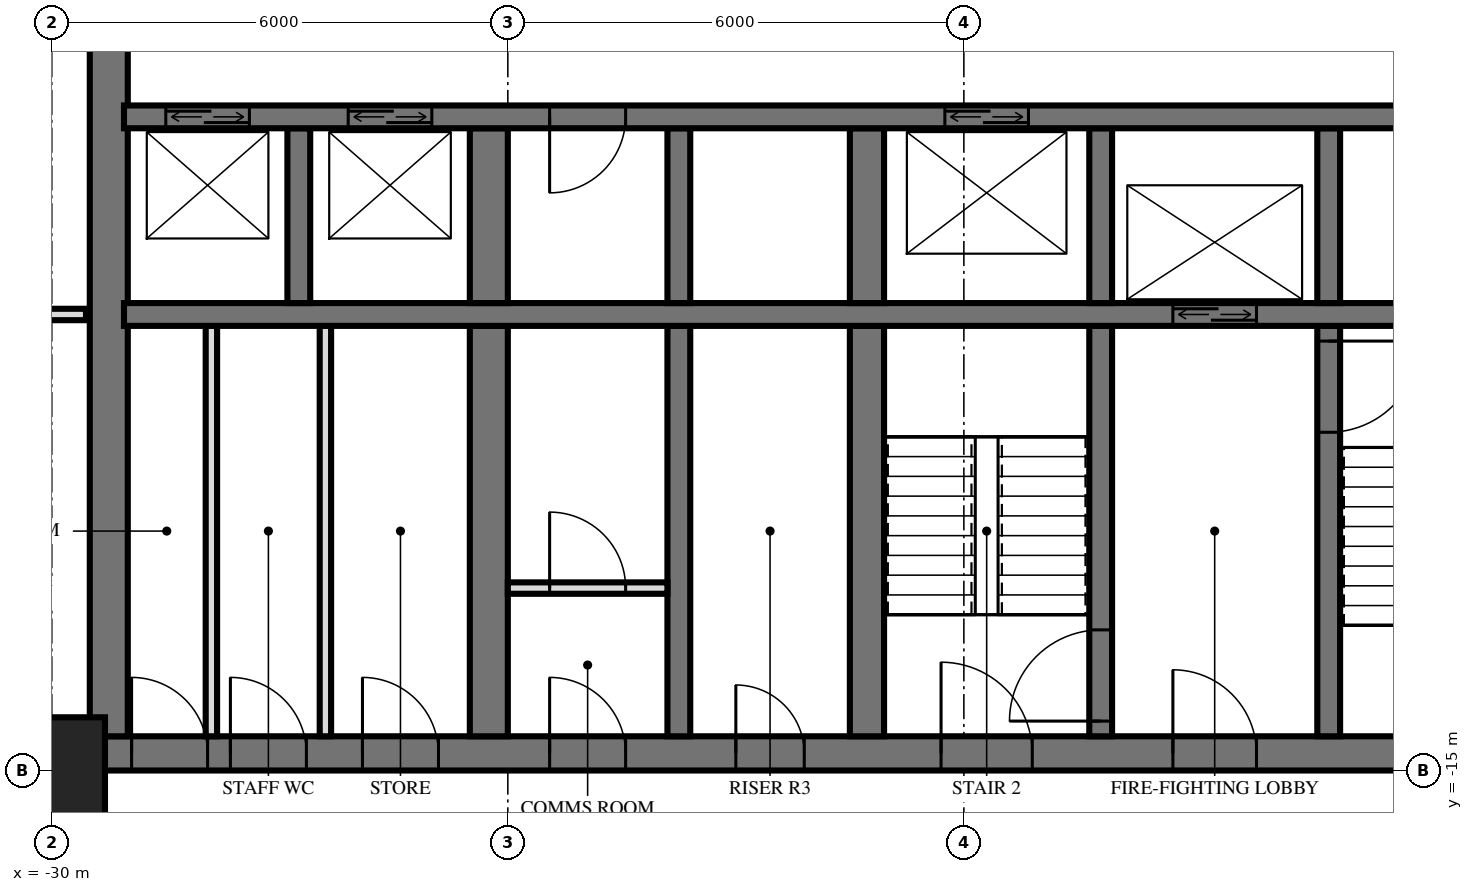
"""IFC4 building model, lengths in metres.
Left out: names, types, materials, properties, quantities, classifications, styles, units other than length and angle.
Written with IfcOpenShell. Run it as: python <this file> out.ifc"""

import sys

from ifc_helpers import new_model, si_unit, direction, frame, frame_2d, origin, origin_2d, place, context, subcontext, project, spatial, rectangle, extrude, element, fill, save


model = new_model("IFC4")
c1 = context("Model", 3, precision=1e-05, world=origin(), true_north=direction((0.0, 1.0)))
c2 = subcontext(c1, "Body", "Model", "MODEL_VIEW")
j1 = project(units=[si_unit("LENGTHUNIT", "METRE"), si_unit("PLANEANGLEUNIT", "RADIAN")], contexts=[c1])
p1 = place(None, origin())
s1 = spatial("IfcSite", under=j1, at=p1, CompositionType="ELEMENT")
p2 = place(p1, origin())
s2 = spatial("IfcBuilding", under=s1, at=p2, CompositionType="ELEMENT")
p3 = place(p2, frame((0.0, 0.0, 42.0)))
s3 = spatial("IfcBuildingStorey", under=s2, at=p3, CompositionType="ELEMENT", Elevation=42.0)
p4 = place(p3, frame((-30.0, -15.0, 0.0), z_axis=(0.0, 0.0, 1.0), x_axis=(1.0, 0.0, 0.0)))
e1 = element("IfcColumn", 1, at=p4, inside=s3, PredefinedType="COLUMN", context=c2, shape_type="SweptSolid", body=[
    extrude(rectangle(XDim=1.4, YDim=1.4, at=origin_2d()), origin(), (0.0, 0.0, 1.0), 3.6),
])
p5 = place(p3, frame((-29.5, -14.775, 0.0), z_axis=(0.0, 0.0, 1.0), x_axis=(1.0, 0.0, 0.0)))
e2 = element("IfcWall", 2, at=p5, inside=s3, PredefinedType="SHEAR", context=c2, shape_type="SweptSolid", body=[
    extrude(rectangle(XDim=19.5, YDim=0.45, at=frame_2d((9.75, 0.0))), origin(), (0.0, 0.0, 1.0), 3.6),
])
p6 = place(p5, frame((11.2, 0.0, 0.0)))
e3 = element("IfcOpeningElement", 3, at=p6, cuts=e2, PredefinedType="OPENING", context=c2, shape_type="SweptSolid", body=[
    extrude(rectangle(XDim=1.2, YDim=2.1, at=frame_2d((0.6, 1.05))), frame((0.0, 0.235, 0.0), z_axis=(0.0, -1.0, 0.0), x_axis=(1.0, 0.0, 0.0)), (0.0, 0.0, 1.0), 0.47),
])
p7 = place(p5, frame((14.25, 0.0, 0.0)))
e4 = element("IfcOpeningElement", 4, at=p7, cuts=e2, PredefinedType="OPENING", context=c2, shape_type="SweptSolid", body=[
    extrude(rectangle(XDim=1.1, YDim=2.1, at=frame_2d((0.55, 1.05))), frame((0.0, 0.235, 0.0), z_axis=(0.0, -1.0, 0.0), x_axis=(1.0, 0.0, 0.0)), (0.0, 0.0, 1.0), 0.47),
])
p8 = place(p5, frame((8.5, 0.0, 0.0)))
e5 = element("IfcOpeningElement", 5, at=p8, cuts=e2, PredefinedType="OPENING", context=c2, shape_type="SweptSolid", body=[
    extrude(rectangle(XDim=0.9, YDim=2.1, at=frame_2d((0.45, 1.05))), frame((0.0, 0.235, 0.0), z_axis=(0.0, -1.0, 0.0), x_axis=(1.0, 0.0, 0.0)), (0.0, 0.0, 1.0), 0.47),
])
p9 = place(p5, frame((6.05, 0.0, 0.0)))
e6 = element("IfcOpeningElement", 6, at=p9, cuts=e2, PredefinedType="OPENING", context=c2, shape_type="SweptSolid", body=[
    extrude(rectangle(XDim=1.0, YDim=2.1, at=frame_2d((0.5, 1.05))), frame((0.0, 0.235, 0.0), z_axis=(0.0, -1.0, 0.0), x_axis=(1.0, 0.0, 0.0)), (0.0, 0.0, 1.0), 0.47),
])
p10 = place(p5, frame((3.587, 0.0, 0.0)))
e7 = element("IfcOpeningElement", 7, at=p10, cuts=e2, PredefinedType="OPENING", context=c2, shape_type="SweptSolid", body=[
    extrude(rectangle(XDim=1.0, YDim=2.1, at=frame_2d((0.5, 1.05))), frame((0.0, 0.235, 0.0), z_axis=(0.0, -1.0, 0.0), x_axis=(1.0, 0.0, 0.0)), (0.0, 0.0, 1.0), 0.47),
])
p11 = place(p5, frame((1.85, 0.0, 0.0)))
e8 = element("IfcOpeningElement", 8, at=p11, cuts=e2, PredefinedType="OPENING", context=c2, shape_type="SweptSolid", body=[
    extrude(rectangle(XDim=1.0, YDim=2.1, at=frame_2d((0.5, 1.05))), frame((0.0, 0.235, 0.0), z_axis=(0.0, -1.0, 0.0), x_axis=(1.0, 0.0, 0.0)), (0.0, 0.0, 1.0), 0.47),
])
p12 = place(p5, frame((0.55, 0.0, 0.0)))
e9 = element("IfcOpeningElement", 9, at=p12, cuts=e2, PredefinedType="OPENING", context=c2, shape_type="SweptSolid", body=[
    extrude(rectangle(XDim=1.0, YDim=2.1, at=frame_2d((0.5, 1.05))), frame((0.0, 0.235, 0.0), z_axis=(0.0, -1.0, 0.0), x_axis=(1.0, 0.0, 0.0)), (0.0, 0.0, 1.0), 0.47),
])
p13 = place(p3, frame((-29.25, -14.55, 0.0), z_axis=(0.0, 0.0, 1.0), x_axis=(0.0, 1.0, 0.0)))
e10 = element("IfcWall", 10, at=p13, inside=s3, PredefinedType="SHEAR", context=c2, shape_type="SweptSolid", body=[
    extrude(rectangle(XDim=14.1, YDim=0.5, at=frame_2d((7.05, 0.0))), origin(), (0.0, 0.0, 1.0), 3.6),
])
p14 = place(p3, frame((-29.05, -6.4, 0.0), z_axis=(0.0, 0.0, 1.0), x_axis=(1.0, 0.0, 0.0)))
e11 = element("IfcWall", 11, at=p14, inside=s3, PredefinedType="SHEAR", context=c2, shape_type="SweptSolid", body=[
    extrude(rectangle(XDim=18.7, YDim=0.3, at=frame_2d((9.35, 0.0))), origin(), (0.0, 0.0, 1.0), 3.6),
])
p15 = place(p14, frame((2.95, 0.0, 0.0)))
e12 = element("IfcOpeningElement", 12, at=p15, cuts=e11, PredefinedType="OPENING", context=c2, shape_type="SweptSolid", body=[
    extrude(rectangle(XDim=1.1, YDim=2.1, at=frame_2d((0.55, 1.05))), frame((0.0, 0.16, 0.0), z_axis=(0.0, -1.0, 0.0), x_axis=(1.0, 0.0, 0.0)), (0.0, 0.0, 1.0), 0.32),
])
p16 = place(p14, frame((0.55, 0.0, 0.0)))
e13 = element("IfcOpeningElement", 13, at=p16, cuts=e11, PredefinedType="OPENING", context=c2, shape_type="SweptSolid", body=[
    extrude(rectangle(XDim=1.1, YDim=2.1, at=frame_2d((0.55, 1.05))), frame((0.0, 0.16, 0.0), z_axis=(0.0, -1.0, 0.0), x_axis=(1.0, 0.0, 0.0)), (0.0, 0.0, 1.0), 0.32),
])
p17 = place(p14, frame((10.8, 0.0, 0.0)))
e14 = element("IfcOpeningElement", 14, at=p17, cuts=e11, PredefinedType="OPENING", context=c2, shape_type="SweptSolid", body=[
    extrude(rectangle(XDim=1.1, YDim=2.1, at=frame_2d((0.55, 1.05))), frame((0.0, 0.16, 0.0), z_axis=(0.0, -1.0, 0.0), x_axis=(1.0, 0.0, 0.0)), (0.0, 0.0, 1.0), 0.32),
])
p18 = place(p14, frame((5.6, 0.0, 0.0)))
e15 = element("IfcOpeningElement", 15, at=p18, cuts=e11, PredefinedType="OPENING", context=c2, shape_type="SweptSolid", body=[
    extrude(rectangle(XDim=1.0, YDim=2.1, at=frame_2d((0.5, 1.05))), frame((0.0, 0.16, 0.0), z_axis=(0.0, -1.0, 0.0), x_axis=(1.0, 0.0, 0.0)), (0.0, 0.0, 1.0), 0.32),
])
p19 = place(p3, frame((-29.05, -9.0, 0.0), z_axis=(0.0, 0.0, 1.0), x_axis=(1.0, 0.0, 0.0)))
e16 = element("IfcWall", 16, at=p19, inside=s3, PredefinedType="SHEAR", context=c2, shape_type="SweptSolid", body=[
    extrude(rectangle(XDim=18.7, YDim=0.3, at=frame_2d((9.35, 0.0))), origin(), (0.0, 0.0, 1.0), 3.6),
])
p20 = place(p19, frame((13.8, 0.0, 0.0)))
e17 = element("IfcOpeningElement", 17, at=p20, cuts=e16, PredefinedType="OPENING", context=c2, shape_type="SweptSolid", body=[
    extrude(rectangle(XDim=1.1, YDim=2.1, at=frame_2d((0.55, 1.05))), frame((0.0, 0.16, 0.0), z_axis=(0.0, -1.0, 0.0), x_axis=(1.0, 0.0, 0.0)), (0.0, 0.0, 1.0), 0.32),
])
p21 = place(p3, frame((-13.2, -8.85, 0.0), z_axis=(0.0, 0.0, 1.0), x_axis=(0.0, 1.0, 0.0)))
e18 = element("IfcWall", 18, at=p21, inside=s3, PredefinedType="SHEAR", context=c2, shape_type="SweptSolid", body=[
    extrude(rectangle(XDim=2.3, YDim=0.3, at=frame_2d((1.15, 0.0))), origin(), (0.0, 0.0, 1.0), 3.6),
])
p22 = place(p3, frame((-13.2, -14.55, 0.0), z_axis=(0.0, 0.0, 1.0), x_axis=(0.0, 1.0, 0.0)))
e19 = element("IfcWall", 19, at=p22, inside=s3, PredefinedType="SHEAR", context=c2, shape_type="SweptSolid", body=[
    extrude(rectangle(XDim=5.4, YDim=0.3, at=frame_2d((2.7, 0.0))), origin(), (0.0, 0.0, 1.0), 3.6),
])
p23 = place(p22, frame((4.0, 0.0, 0.0)))
e20 = element("IfcOpeningElement", 20, at=p23, cuts=e19, PredefinedType="OPENING", context=c2, shape_type="SweptSolid", body=[
    extrude(rectangle(XDim=1.2, YDim=2.1, at=frame_2d((0.6, 1.05))), frame((0.0, 0.16, 0.0), z_axis=(0.0, -1.0, 0.0), x_axis=(1.0, 0.0, 0.0)), (0.0, 0.0, 1.0), 0.32),
])
p24 = place(p3, frame((-16.2, -8.85, 0.0), z_axis=(0.0, 0.0, 1.0), x_axis=(0.0, 1.0, 0.0)))
e21 = element("IfcWall", 21, at=p24, inside=s3, PredefinedType="SHEAR", context=c2, shape_type="SweptSolid", body=[
    extrude(rectangle(XDim=2.3, YDim=0.3, at=frame_2d((1.15, 0.0))), origin(), (0.0, 0.0, 1.0), 3.6),
])
p25 = place(p3, frame((-16.2, -14.55, 0.0), z_axis=(0.0, 0.0, 1.0), x_axis=(0.0, 1.0, 0.0)))
e22 = element("IfcWall", 22, at=p25, inside=s3, PredefinedType="SHEAR", context=c2, shape_type="SweptSolid", body=[
    extrude(rectangle(XDim=5.4, YDim=0.3, at=frame_2d((2.7, 0.0))), origin(), (0.0, 0.0, 1.0), 3.6),
])
p26 = place(p25, frame((0.2, 0.0, 0.0)))
e23 = element("IfcOpeningElement", 23, at=p26, cuts=e22, PredefinedType="OPENING", context=c2, shape_type="SweptSolid", body=[
    extrude(rectangle(XDim=1.2, YDim=2.1, at=frame_2d((0.6, 1.05))), frame((0.0, 0.16, 0.0), z_axis=(0.0, -1.0, 0.0), x_axis=(1.0, 0.0, 0.0)), (0.0, 0.0, 1.0), 0.32),
])
p27 = place(p3, frame((-19.275, -8.85, 0.0), z_axis=(0.0, 0.0, 1.0), x_axis=(0.0, 1.0, 0.0)))
e24 = element("IfcWall", 24, at=p27, inside=s3, PredefinedType="SHEAR", context=c2, shape_type="SweptSolid", body=[
    extrude(rectangle(XDim=2.3, YDim=0.45, at=frame_2d((1.15, 0.0))), origin(), (0.0, 0.0, 1.0), 3.6),
])
p28 = place(p3, frame((-19.275, -14.55, 0.0), z_axis=(0.0, 0.0, 1.0), x_axis=(0.0, 1.0, 0.0)))
e25 = element("IfcWall", 25, at=p28, inside=s3, PredefinedType="SHEAR", context=c2, shape_type="SweptSolid", body=[
    extrude(rectangle(XDim=5.4, YDim=0.45, at=frame_2d((2.7, 0.0))), origin(), (0.0, 0.0, 1.0), 3.6),
])
p29 = place(p3, frame((-21.75, -8.85, 0.0), z_axis=(0.0, 0.0, 1.0), x_axis=(0.0, 1.0, 0.0)))
e26 = element("IfcWall", 26, at=p29, inside=s3, PredefinedType="SHEAR", context=c2, shape_type="SweptSolid", body=[
    extrude(rectangle(XDim=2.3, YDim=0.3, at=frame_2d((1.15, 0.0))), origin(), (0.0, 0.0, 1.0), 3.6),
])
p30 = place(p3, frame((-21.75, -14.55, 0.0), z_axis=(0.0, 0.0, 1.0), x_axis=(0.0, 1.0, 0.0)))
e27 = element("IfcWall", 27, at=p30, inside=s3, PredefinedType="SHEAR", context=c2, shape_type="SweptSolid", body=[
    extrude(rectangle(XDim=5.4, YDim=0.3, at=frame_2d((2.7, 0.0))), origin(), (0.0, 0.0, 1.0), 3.6),
])
p31 = place(p3, frame((-24.25, -8.85, 0.0), z_axis=(0.0, 0.0, 1.0), x_axis=(0.0, 1.0, 0.0)))
e28 = element("IfcWall", 28, at=p31, inside=s3, PredefinedType="SHEAR", context=c2, shape_type="SweptSolid", body=[
    extrude(rectangle(XDim=2.3, YDim=0.5, at=frame_2d((1.15, 0.0))), origin(), (0.0, 0.0, 1.0), 3.6),
])
p32 = place(p3, frame((-24.25, -14.55, 0.0), z_axis=(0.0, 0.0, 1.0), x_axis=(0.0, 1.0, 0.0)))
e29 = element("IfcWall", 29, at=p32, inside=s3, PredefinedType="SHEAR", context=c2, shape_type="SweptSolid", body=[
    extrude(rectangle(XDim=5.4, YDim=0.5, at=frame_2d((2.7, 0.0))), origin(), (0.0, 0.0, 1.0), 3.6),
])
p33 = place(p3, frame((-26.75, -8.85, 0.0), z_axis=(0.0, 0.0, 1.0), x_axis=(0.0, 1.0, 0.0)))
e30 = element("IfcWall", 30, at=p33, inside=s3, PredefinedType="SHEAR", context=c2, shape_type="SweptSolid", body=[
    extrude(rectangle(XDim=2.3, YDim=0.3, at=frame_2d((1.15, 0.0))), origin(), (0.0, 0.0, 1.0), 3.6),
])
p34 = place(p3, frame((-24.0, -12.6, 0.0), z_axis=(0.0, 0.0, 1.0), x_axis=(1.0, 0.0, 0.0)))
e31 = element("IfcWall", 31, at=p34, inside=s3, PredefinedType="PARTITIONING", context=c2, shape_type="SweptSolid", body=[
    extrude(rectangle(XDim=2.1, YDim=0.15, at=frame_2d((1.05, 0.0))), origin(), (0.0, 0.0, 1.0), 3.3),
])
p35 = place(p34, frame((0.55, 0.0, 0.0)))
e32 = element("IfcOpeningElement", 32, at=p35, cuts=e31, PredefinedType="OPENING", context=c2, shape_type="SweptSolid", body=[
    extrude(rectangle(XDim=1.0, YDim=2.1, at=frame_2d((0.5, 1.05))), frame((0.0, 0.085, 0.0), z_axis=(0.0, -1.0, 0.0), x_axis=(1.0, 0.0, 0.0)), (0.0, 0.0, 1.0), 0.17),
])
for number, where, z_axis, x_axis in (
    (33, (-26.4, -14.55, 0.0), (0.0, 0.0, 1.0), (0.0, 1.0, 0.0)),
    (34, (-27.9, -14.55, 0.0), (0.0, 0.0, 1.0), (0.0, 1.0, 0.0)),
):
    element("IfcWall", number, at=place(p3, frame(where, z_axis=z_axis, x_axis=x_axis)), inside=s3, PredefinedType="PARTITIONING", context=c2, shape_type="SweptSolid", body=[
        extrude(rectangle(XDim=5.4, YDim=0.15, at=frame_2d((2.7, 0.0))), origin(), (0.0, 0.0, 1.0), 3.3),
    ])
p36 = place(p3, frame((-33.12, -15.0, 0.0), z_axis=(0.0, 0.0, 1.0), x_axis=(1.0, 0.0, 0.0)))
e35 = element("IfcWall", 35, at=p36, inside=s3, PredefinedType="PARTITIONING", context=c2, shape_type="SweptSolid", body=[
    extrude(rectangle(XDim=3.57, YDim=0.15, at=frame_2d((1.785, 0.0))), origin(), (0.0, 0.0, 1.0), 3.32),
])
p37 = place(p36, frame((1.58, 0.0, 0.0)))
e36 = element("IfcOpeningElement", 36, at=p37, cuts=e35, PredefinedType="OPENING", context=c2, shape_type="SweptSolid", body=[
    extrude(rectangle(XDim=0.8, YDim=2.1, at=frame_2d((0.4, 1.05))), frame((0.0, 0.085, 0.0), z_axis=(0.0, -1.0, 0.0), x_axis=(1.0, 0.0, 0.0)), (0.0, 0.0, 1.0), 0.17),
])
p38 = place(p3, frame((-33.12, -9.0, 0.0), z_axis=(0.0, 0.0, 1.0), x_axis=(1.0, 0.0, 0.0)))
e37 = element("IfcWall", 37, at=p38, inside=s3, PredefinedType="PARTITIONING", context=c2, shape_type="SweptSolid", body=[
    extrude(rectangle(XDim=3.57, YDim=0.15, at=frame_2d((1.785, 0.0))), origin(), (0.0, 0.0, 1.0), 3.32),
])
p39 = place(p38, frame((1.27, 0.0, 0.0)))
e38 = element("IfcOpeningElement", 38, at=p39, cuts=e37, PredefinedType="OPENING", context=c2, shape_type="SweptSolid", body=[
    extrude(rectangle(XDim=0.9, YDim=2.1, at=frame_2d((0.45, 1.05))), frame((0.0, 0.085, 0.0), z_axis=(0.0, -1.0, 0.0), x_axis=(1.0, 0.0, 0.0)), (0.0, 0.0, 1.0), 0.17),
])
p40 = place(p15, origin())
e39 = element("IfcDoor", 39, at=p40, inside=s3, OperationType="DOUBLE_DOOR_SLIDING", PredefinedType="USERDEFINED", context=c2, shape_type="SweptSolid", body=[
    extrude(rectangle(XDim=1.1, YDim=2.1, at=frame_2d((0.55, 1.05))), frame((0.0, 0.025, 0.0), z_axis=(0.0, -1.0, 0.0), x_axis=(1.0, 0.0, 0.0)), (0.0, 0.0, 1.0), 0.05),
])
fill(e12, e39)
p41 = place(p16, origin())
e40 = element("IfcDoor", 40, at=p41, inside=s3, OperationType="DOUBLE_DOOR_SLIDING", PredefinedType="USERDEFINED", context=c2, shape_type="SweptSolid", body=[
    extrude(rectangle(XDim=1.1, YDim=2.1, at=frame_2d((0.55, 1.05))), frame((0.0, 0.025, 0.0), z_axis=(0.0, -1.0, 0.0), x_axis=(1.0, 0.0, 0.0)), (0.0, 0.0, 1.0), 0.05),
])
fill(e13, e40)
p42 = place(p20, origin())
e41 = element("IfcDoor", 41, at=p42, inside=s3, OperationType="DOUBLE_DOOR_SLIDING", PredefinedType="USERDEFINED", context=c2, shape_type="SweptSolid", body=[
    extrude(rectangle(XDim=1.1, YDim=2.1, at=frame_2d((0.55, 1.05))), frame((0.0, 0.025, 0.0), z_axis=(0.0, -1.0, 0.0), x_axis=(1.0, 0.0, 0.0)), (0.0, 0.0, 1.0), 0.05),
])
fill(e17, e41)
p43 = place(p17, origin())
e42 = element("IfcDoor", 42, at=p43, inside=s3, OperationType="DOUBLE_DOOR_SLIDING", PredefinedType="USERDEFINED", context=c2, shape_type="SweptSolid", body=[
    extrude(rectangle(XDim=1.1, YDim=2.1, at=frame_2d((0.55, 1.05))), frame((0.0, 0.025, 0.0), z_axis=(0.0, -1.0, 0.0), x_axis=(1.0, 0.0, 0.0)), (0.0, 0.0, 1.0), 0.05),
])
fill(e14, e42)
p44 = place(p6, origin())
e43 = element("IfcDoor", 43, at=p44, inside=s3, OperationType="SINGLE_SWING_RIGHT", PredefinedType="DOOR", context=c2, shape_type="SweptSolid", body=[
    extrude(rectangle(XDim=1.2, YDim=2.1, at=frame_2d((0.6, 1.05))), frame((0.0, 0.025, 0.0), z_axis=(0.0, -1.0, 0.0), x_axis=(1.0, 0.0, 0.0)), (0.0, 0.0, 1.0), 0.05),
])
fill(e3, e43)
p45 = place(p7, origin())
e44 = element("IfcDoor", 44, at=p45, inside=s3, OperationType="SINGLE_SWING_RIGHT", PredefinedType="DOOR", context=c2, shape_type="SweptSolid", body=[
    extrude(rectangle(XDim=1.1, YDim=2.1, at=frame_2d((0.55, 1.05))), frame((0.0, 0.025, 0.0), z_axis=(0.0, -1.0, 0.0), x_axis=(1.0, 0.0, 0.0)), (0.0, 0.0, 1.0), 0.05),
])
fill(e4, e44)
p46 = place(p8, origin())
e45 = element("IfcDoor", 45, at=p46, inside=s3, OperationType="SINGLE_SWING_RIGHT", PredefinedType="DOOR", context=c2, shape_type="SweptSolid", body=[
    extrude(rectangle(XDim=0.9, YDim=2.1, at=frame_2d((0.45, 1.05))), frame((0.0, 0.025, 0.0), z_axis=(0.0, -1.0, 0.0), x_axis=(1.0, 0.0, 0.0)), (0.0, 0.0, 1.0), 0.05),
])
fill(e5, e45)
p47 = place(p9, origin())
e46 = element("IfcDoor", 46, at=p47, inside=s3, OperationType="SINGLE_SWING_RIGHT", PredefinedType="DOOR", context=c2, shape_type="SweptSolid", body=[
    extrude(rectangle(XDim=1.0, YDim=2.1, at=frame_2d((0.5, 1.05))), frame((0.0, 0.025, 0.0), z_axis=(0.0, -1.0, 0.0), x_axis=(1.0, 0.0, 0.0)), (0.0, 0.0, 1.0), 0.05),
])
fill(e6, e46)
p48 = place(p10, origin())
e47 = element("IfcDoor", 47, at=p48, inside=s3, OperationType="SINGLE_SWING_RIGHT", PredefinedType="DOOR", context=c2, shape_type="SweptSolid", body=[
    extrude(rectangle(XDim=1.0, YDim=2.1, at=frame_2d((0.5, 1.05))), frame((0.0, 0.025, 0.0), z_axis=(0.0, -1.0, 0.0), x_axis=(1.0, 0.0, 0.0)), (0.0, 0.0, 1.0), 0.05),
])
fill(e7, e47)
p49 = place(p11, origin())
e48 = element("IfcDoor", 48, at=p49, inside=s3, OperationType="SINGLE_SWING_RIGHT", PredefinedType="DOOR", context=c2, shape_type="SweptSolid", body=[
    extrude(rectangle(XDim=1.0, YDim=2.1, at=frame_2d((0.5, 1.05))), frame((0.0, 0.025, 0.0), z_axis=(0.0, -1.0, 0.0), x_axis=(1.0, 0.0, 0.0)), (0.0, 0.0, 1.0), 0.05),
])
fill(e8, e48)
p50 = place(p12, origin())
e49 = element("IfcDoor", 49, at=p50, inside=s3, OperationType="SINGLE_SWING_RIGHT", PredefinedType="DOOR", context=c2, shape_type="SweptSolid", body=[
    extrude(rectangle(XDim=1.0, YDim=2.1, at=frame_2d((0.5, 1.05))), frame((0.0, 0.025, 0.0), z_axis=(0.0, -1.0, 0.0), x_axis=(1.0, 0.0, 0.0)), (0.0, 0.0, 1.0), 0.05),
])
fill(e9, e49)
p51 = place(p18, frame((0.5, 0.0, 0.0), z_axis=(0.0, 0.0, 1.0), x_axis=(-1.0, 0.0, 0.0)))
e50 = element("IfcDoor", 50, at=p51, inside=s3, OperationType="SINGLE_SWING_LEFT", PredefinedType="DOOR", context=c2, shape_type="SweptSolid", body=[
    extrude(rectangle(XDim=1.0, YDim=2.1, at=frame_2d((0.0, 1.05))), frame((0.0, -0.025, 0.0), z_axis=(0.0, 1.0, 0.0), x_axis=(-1.0, 0.0, 0.0)), (0.0, 0.0, 1.0), 0.05),
])
fill(e15, e50)
p52 = place(p23, frame((0.6, 0.0, 0.0), z_axis=(0.0, 0.0, 1.0), x_axis=(-1.0, 0.0, 0.0)))
e51 = element("IfcDoor", 51, at=p52, inside=s3, OperationType="SINGLE_SWING_RIGHT", PredefinedType="DOOR", context=c2, shape_type="SweptSolid", body=[
    extrude(rectangle(XDim=1.2, YDim=2.1, at=frame_2d((0.0, 1.05))), frame((0.0, -0.025, 0.0), z_axis=(0.0, 1.0, 0.0), x_axis=(-1.0, 0.0, 0.0)), (0.0, 0.0, 1.0), 0.05),
])
fill(e20, e51)
p53 = place(p26, origin())
e52 = element("IfcDoor", 52, at=p53, inside=s3, OperationType="SINGLE_SWING_RIGHT", PredefinedType="DOOR", context=c2, shape_type="SweptSolid", body=[
    extrude(rectangle(XDim=1.2, YDim=2.1, at=frame_2d((0.6, 1.05))), frame((0.0, 0.025, 0.0), z_axis=(0.0, -1.0, 0.0), x_axis=(1.0, 0.0, 0.0)), (0.0, 0.0, 1.0), 0.05),
])
fill(e23, e52)
p54 = place(p35, origin())
e53 = element("IfcDoor", 53, at=p54, inside=s3, OperationType="SINGLE_SWING_RIGHT", PredefinedType="DOOR", context=c2, shape_type="SweptSolid", body=[
    extrude(rectangle(XDim=1.0, YDim=2.1, at=frame_2d((0.5, 1.05))), frame((0.0, 0.025, 0.0), z_axis=(0.0, -1.0, 0.0), x_axis=(1.0, 0.0, 0.0)), (0.0, 0.0, 1.0), 0.05),
])
fill(e32, e53)
save(model, sys.argv[1])
